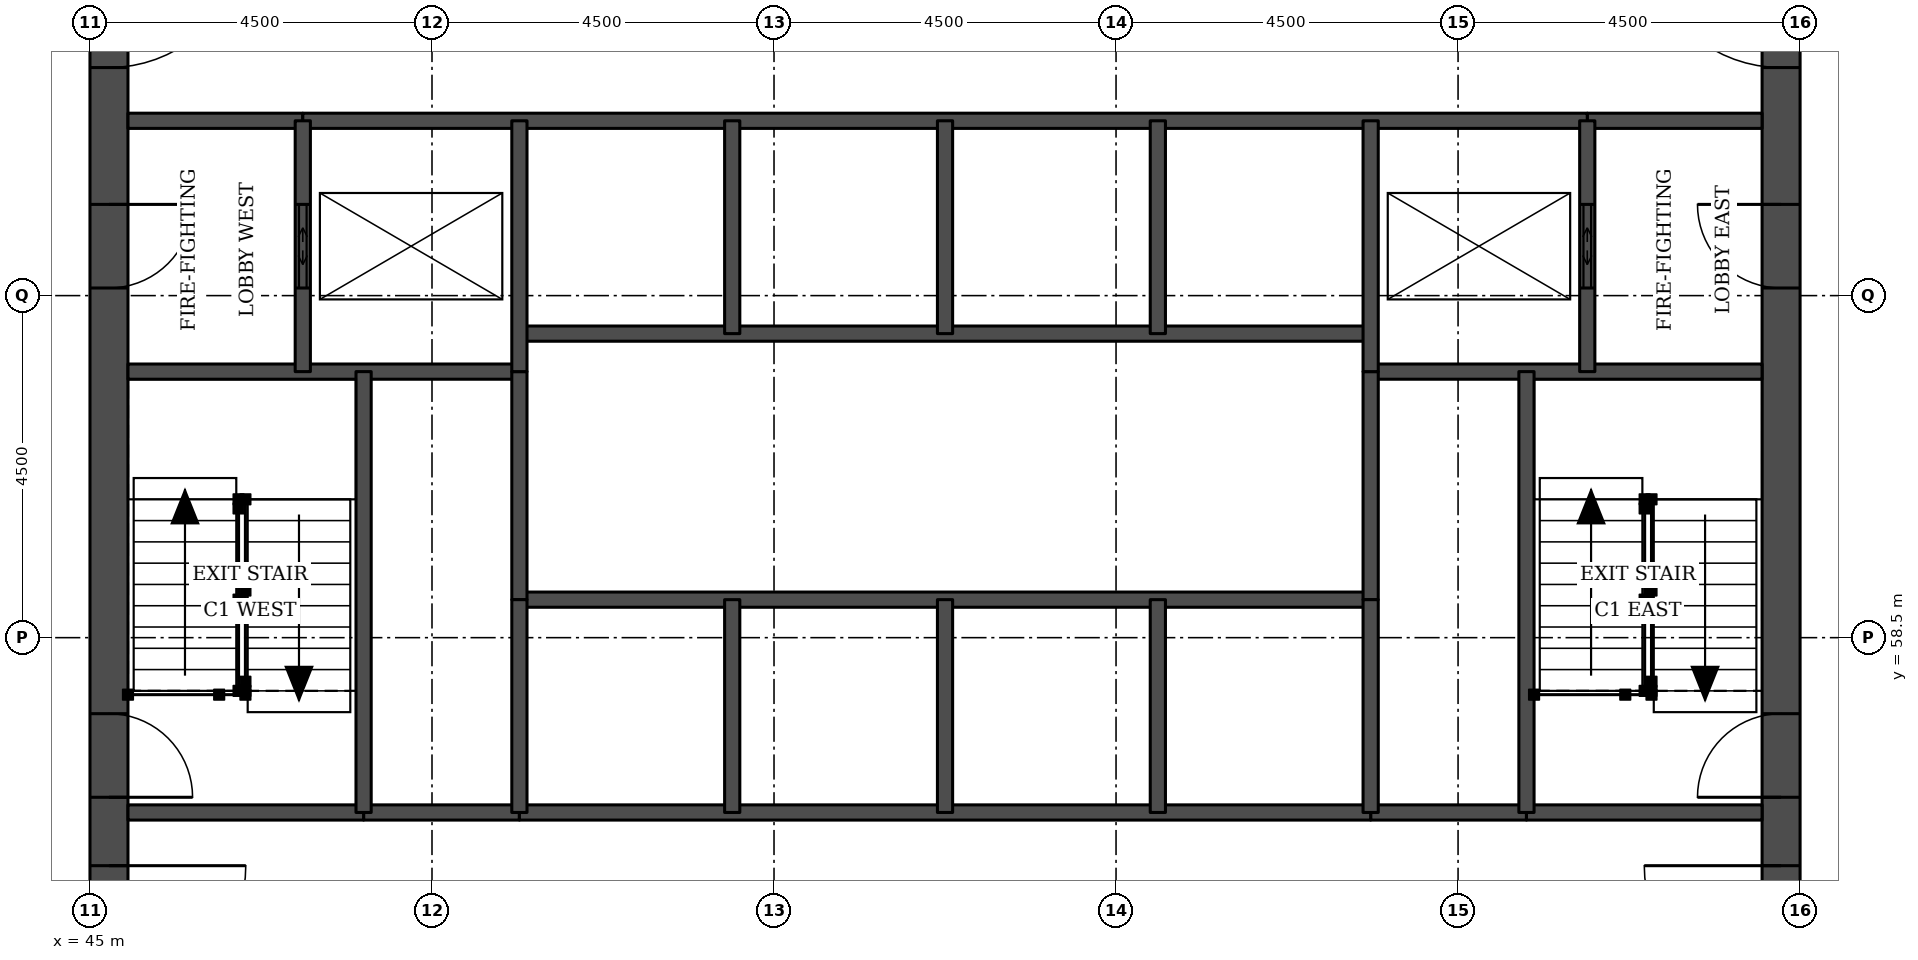
"""IFC4 building model, lengths in metres.
Left out: names, types, materials, properties, quantities, classifications, styles, units other than length and angle.
Written with IfcOpenShell. Run it as: python <this file> out.ifc"""

import sys

from ifc_helpers import new_model, si_unit, direction, frame, frame_2d, origin, place, context, subcontext, project, spatial, rectangle, extrude, element, fill, save


model = new_model("IFC4")
c1 = context("Model", 3, precision=1e-05, world=origin(), true_north=direction((0.0, 1.0)))
c2 = subcontext(c1, "Body", "Model", "MODEL_VIEW")
j1 = project(units=[si_unit("LENGTHUNIT", "METRE"), si_unit("PLANEANGLEUNIT", "RADIAN")], contexts=[c1])
p1 = place(None, origin())
s1 = spatial("IfcSite", under=j1, at=p1, CompositionType="ELEMENT")
p2 = place(p1, origin())
s2 = spatial("IfcBuilding", under=s1, at=p2, CompositionType="ELEMENT")
p3 = place(p2, frame((0.0, 0.0, 23.1)))
s3 = spatial("IfcBuildingStorey", under=s2, at=p3, CompositionType="ELEMENT", Elevation=23.1)
p4 = place(p3, frame((45.25, 49.5, 0.0), z_axis=(0.0, 0.0, 1.0), x_axis=(0.0, 1.0, 0.0)))
e1 = element("IfcWall", 1, at=p4, inside=s3, PredefinedType="SHEAR", context=c2, shape_type="SweptSolid", body=[
    extrude(rectangle(XDim=22.5, YDim=0.5, at=frame_2d((11.25, 0.0))), origin(), (0.0, 0.0, 1.0), 3.3),
])
p5 = place(p4, frame((4.2, 0.0, 0.0)))
e2 = element("IfcOpeningElement", 2, at=p5, cuts=e1, PredefinedType="OPENING", context=c2, shape_type="SweptSolid", body=[
    extrude(rectangle(XDim=1.8, YDim=2.1, at=frame_2d((0.9, 1.05))), frame((0.0, 0.26, 0.0), z_axis=(0.0, -1.0, 0.0), x_axis=(1.0, 0.0, 0.0)), (0.0, 0.0, 1.0), 0.52),
])
p6 = place(p4, frame((6.9, 0.0, 0.0)))
e3 = element("IfcOpeningElement", 3, at=p6, cuts=e1, PredefinedType="OPENING", context=c2, shape_type="SweptSolid", body=[
    extrude(rectangle(XDim=1.1, YDim=2.1, at=frame_2d((0.55, 1.05))), frame((0.0, 0.26, 0.0), z_axis=(0.0, -1.0, 0.0), x_axis=(1.0, 0.0, 0.0)), (0.0, 0.0, 1.0), 0.52),
])
p7 = place(p4, frame((13.6, 0.0, 0.0)))
e4 = element("IfcOpeningElement", 4, at=p7, cuts=e1, PredefinedType="OPENING", context=c2, shape_type="SweptSolid", body=[
    extrude(rectangle(XDim=1.1, YDim=2.1, at=frame_2d((0.55, 1.05))), frame((0.0, 0.26, 0.0), z_axis=(0.0, -1.0, 0.0), x_axis=(1.0, 0.0, 0.0)), (0.0, 0.0, 1.0), 0.52),
])
p8 = place(p4, frame((16.5, 0.0, 0.0)))
e5 = element("IfcOpeningElement", 5, at=p8, cuts=e1, PredefinedType="OPENING", context=c2, shape_type="SweptSolid", body=[
    extrude(rectangle(XDim=1.8, YDim=2.1, at=frame_2d((0.9, 1.05))), frame((0.0, 0.26, 0.0), z_axis=(0.0, -1.0, 0.0), x_axis=(1.0, 0.0, 0.0)), (0.0, 0.0, 1.0), 0.52),
])
p9 = place(p3, frame((67.25, 49.5, 0.0), z_axis=(0.0, 0.0, 1.0), x_axis=(0.0, 1.0, 0.0)))
e6 = element("IfcWall", 6, at=p9, inside=s3, PredefinedType="SHEAR", context=c2, shape_type="SweptSolid", body=[
    extrude(rectangle(XDim=22.5, YDim=0.5, at=frame_2d((11.25, 0.0))), origin(), (0.0, 0.0, 1.0), 3.3),
])
p10 = place(p9, frame((4.2, 0.0, 0.0)))
e7 = element("IfcOpeningElement", 7, at=p10, cuts=e6, PredefinedType="OPENING", context=c2, shape_type="SweptSolid", body=[
    extrude(rectangle(XDim=1.8, YDim=2.1, at=frame_2d((0.9, 1.05))), frame((0.0, 0.26, 0.0), z_axis=(0.0, -1.0, 0.0), x_axis=(1.0, 0.0, 0.0)), (0.0, 0.0, 1.0), 0.52),
])
p11 = place(p9, frame((6.9, 0.0, 0.0)))
e8 = element("IfcOpeningElement", 8, at=p11, cuts=e6, PredefinedType="OPENING", context=c2, shape_type="SweptSolid", body=[
    extrude(rectangle(XDim=1.1, YDim=2.1, at=frame_2d((0.55, 1.05))), frame((0.0, 0.26, 0.0), z_axis=(0.0, -1.0, 0.0), x_axis=(1.0, 0.0, 0.0)), (0.0, 0.0, 1.0), 0.52),
])
p12 = place(p9, frame((13.6, 0.0, 0.0)))
e9 = element("IfcOpeningElement", 9, at=p12, cuts=e6, PredefinedType="OPENING", context=c2, shape_type="SweptSolid", body=[
    extrude(rectangle(XDim=1.1, YDim=2.1, at=frame_2d((0.55, 1.05))), frame((0.0, 0.26, 0.0), z_axis=(0.0, -1.0, 0.0), x_axis=(1.0, 0.0, 0.0)), (0.0, 0.0, 1.0), 0.52),
])
p13 = place(p9, frame((16.5, 0.0, 0.0)))
e10 = element("IfcOpeningElement", 10, at=p13, cuts=e6, PredefinedType="OPENING", context=c2, shape_type="SweptSolid", body=[
    extrude(rectangle(XDim=1.8, YDim=2.1, at=frame_2d((0.9, 1.05))), frame((0.0, 0.26, 0.0), z_axis=(0.0, -1.0, 0.0), x_axis=(1.0, 0.0, 0.0)), (0.0, 0.0, 1.0), 0.52),
])
for number, where, z_axis, x_axis in (
    (11, (48.6, 56.2, 0.0), (0.0, 0.0, 1.0), (1.0, 0.0, 0.0)),
    (12, (61.85, 56.2, 0.0), (0.0, 0.0, 1.0), (1.0, 0.0, 0.0)),
):
    element("IfcWall", number, at=place(p3, frame(where, z_axis=z_axis, x_axis=x_axis)), inside=s3, PredefinedType="SOLIDWALL", context=c2, shape_type="SweptSolid", body=[
        extrude(rectangle(XDim=2.05, YDim=0.2, at=frame_2d((1.025, 0.0))), origin(), (0.0, 0.0, 1.0), 3.08),
    ])
p14 = place(p3, frame((45.5, 56.2, 0.0), z_axis=(0.0, 0.0, 1.0), x_axis=(1.0, 0.0, 0.0)))
e13 = element("IfcWall", 13, at=p14, inside=s3, PredefinedType="SOLIDWALL", context=c2, shape_type="SweptSolid", body=[
    extrude(rectangle(XDim=3.1, YDim=0.2, at=frame_2d((1.55, 0.0))), origin(), (0.0, 0.0, 1.0), 3.08),
])
p15 = place(p3, frame((50.65, 56.2, 0.0), z_axis=(0.0, 0.0, 1.0), x_axis=(1.0, 0.0, 0.0)))
e14 = element("IfcWall", 14, at=p15, inside=s3, PredefinedType="SOLIDWALL", context=c2, shape_type="SweptSolid", body=[
    extrude(rectangle(XDim=11.2, YDim=0.2, at=frame_2d((5.6, 0.0))), origin(), (0.0, 0.0, 1.0), 3.08),
])
p16 = place(p3, frame((63.9, 56.2, 0.0), z_axis=(0.0, 0.0, 1.0), x_axis=(1.0, 0.0, 0.0)))
e15 = element("IfcWall", 15, at=p16, inside=s3, PredefinedType="SOLIDWALL", context=c2, shape_type="SweptSolid", body=[
    extrude(rectangle(XDim=3.1, YDim=0.2, at=frame_2d((1.55, 0.0))), origin(), (0.0, 0.0, 1.0), 3.08),
])
p17 = place(p3, frame((50.65, 59.0, 0.0), z_axis=(0.0, 0.0, 1.0), x_axis=(1.0, 0.0, 0.0)))
e16 = element("IfcWall", 16, at=p17, inside=s3, PredefinedType="SOLIDWALL", context=c2, shape_type="SweptSolid", body=[
    extrude(rectangle(XDim=11.2, YDim=0.2, at=frame_2d((5.6, 0.0))), origin(), (0.0, 0.0, 1.0), 3.3),
])
for number, where, z_axis, x_axis in (
    (17, (45.5, 62.0, 0.0), (0.0, 0.0, 1.0), (1.0, 0.0, 0.0)),
    (18, (61.85, 62.0, 0.0), (0.0, 0.0, 1.0), (1.0, 0.0, 0.0)),
):
    element("IfcWall", number, at=place(p3, frame(where, z_axis=z_axis, x_axis=x_axis)), inside=s3, PredefinedType="SOLIDWALL", context=c2, shape_type="SweptSolid", body=[
        extrude(rectangle(XDim=5.15, YDim=0.2, at=frame_2d((2.575, 0.0))), origin(), (0.0, 0.0, 1.0), 3.08),
    ])
p18 = place(p3, frame((50.65, 62.5, 0.0), z_axis=(0.0, 0.0, 1.0), x_axis=(1.0, 0.0, 0.0)))
e19 = element("IfcWall", 19, at=p18, inside=s3, PredefinedType="SOLIDWALL", context=c2, shape_type="SweptSolid", body=[
    extrude(rectangle(XDim=11.2, YDim=0.2, at=frame_2d((5.6, 0.0))), origin(), (0.0, 0.0, 1.0), 3.3),
])
for number, where, z_axis, x_axis in (
    (20, (45.5, 65.3, 0.0), (0.0, 0.0, 1.0), (1.0, 0.0, 0.0)),
    (21, (64.7, 65.3, 0.0), (0.0, 0.0, 1.0), (1.0, 0.0, 0.0)),
):
    element("IfcWall", number, at=place(p3, frame(where, z_axis=z_axis, x_axis=x_axis)), inside=s3, PredefinedType="SOLIDWALL", context=c2, shape_type="SweptSolid", body=[
        extrude(rectangle(XDim=2.3, YDim=0.2, at=frame_2d((1.15, 0.0))), origin(), (0.0, 0.0, 1.0), 3.08),
    ])
p19 = place(p3, frame((47.8, 65.3, 0.0), z_axis=(0.0, 0.0, 1.0), x_axis=(1.0, 0.0, 0.0)))
e22 = element("IfcWall", 22, at=p19, inside=s3, PredefinedType="SOLIDWALL", context=c2, shape_type="SweptSolid", body=[
    extrude(rectangle(XDim=16.9, YDim=0.2, at=frame_2d((8.45, 0.0))), origin(), (0.0, 0.0, 1.0), 3.08),
])
p20 = place(p3, frame((47.8, 62.0, 0.0), z_axis=(0.0, 0.0, 1.0), x_axis=(0.0, 1.0, 0.0)))
e23 = element("IfcWall", 23, at=p20, inside=s3, PredefinedType="SOLIDWALL", context=c2, shape_type="SweptSolid", body=[
    extrude(rectangle(XDim=3.3, YDim=0.2, at=frame_2d((1.65, 0.0))), origin(), (0.0, 0.0, 1.0), 3.08),
])
p21 = place(p20, frame((1.1, 0.0, 0.0)))
e24 = element("IfcOpeningElement", 24, at=p21, cuts=e23, PredefinedType="OPENING", context=c2, shape_type="SweptSolid", body=[
    extrude(rectangle(XDim=1.1, YDim=2.1, at=frame_2d((0.55, 1.05))), frame((0.0, 0.11, 0.0), z_axis=(0.0, -1.0, 0.0), x_axis=(1.0, 0.0, 0.0)), (0.0, 0.0, 1.0), 0.22),
])
p22 = place(p3, frame((48.6, 56.2, 0.0), z_axis=(0.0, 0.0, 1.0), x_axis=(0.0, 1.0, 0.0)))
e25 = element("IfcWall", 25, at=p22, inside=s3, PredefinedType="SOLIDWALL", context=c2, shape_type="SweptSolid", body=[
    extrude(rectangle(XDim=5.8, YDim=0.2, at=frame_2d((2.9, 0.0))), origin(), (0.0, 0.0, 1.0), 3.08),
])
p23 = place(p3, frame((50.65, 59.0, 0.0), z_axis=(0.0, 0.0, 1.0), x_axis=(0.0, 1.0, 0.0)))
e26 = element("IfcWall", 26, at=p23, inside=s3, PredefinedType="SOLIDWALL", context=c2, shape_type="SweptSolid", body=[
    extrude(rectangle(XDim=3.0, YDim=0.2, at=frame_2d((1.5, 0.0))), origin(), (0.0, 0.0, 1.0), 3.3),
])
p24 = place(p3, frame((50.65, 56.2, 0.0), z_axis=(0.0, 0.0, 1.0), x_axis=(0.0, 1.0, 0.0)))
e27 = element("IfcWall", 27, at=p24, inside=s3, PredefinedType="SOLIDWALL", context=c2, shape_type="SweptSolid", body=[
    extrude(rectangle(XDim=2.8, YDim=0.2, at=frame_2d((1.4, 0.0))), origin(), (0.0, 0.0, 1.0), 3.08),
])
p25 = place(p3, frame((50.65, 62.0, 0.0), z_axis=(0.0, 0.0, 1.0), x_axis=(0.0, 1.0, 0.0)))
e28 = element("IfcWall", 28, at=p25, inside=s3, PredefinedType="SOLIDWALL", context=c2, shape_type="SweptSolid", body=[
    extrude(rectangle(XDim=3.3, YDim=0.2, at=frame_2d((1.65, 0.0))), origin(), (0.0, 0.0, 1.0), 3.08),
])
for number, where, z_axis, x_axis in (
    (29, (53.45, 56.2, 0.0), (0.0, 0.0, 1.0), (0.0, 1.0, 0.0)),
    (30, (53.45, 62.5, 0.0), (0.0, 0.0, 1.0), (0.0, 1.0, 0.0)),
    (31, (56.25, 56.2, 0.0), (0.0, 0.0, 1.0), (0.0, 1.0, 0.0)),
    (32, (56.25, 62.5, 0.0), (0.0, 0.0, 1.0), (0.0, 1.0, 0.0)),
    (33, (59.05, 56.2, 0.0), (0.0, 0.0, 1.0), (0.0, 1.0, 0.0)),
    (34, (59.05, 62.5, 0.0), (0.0, 0.0, 1.0), (0.0, 1.0, 0.0)),
):
    element("IfcWall", number, at=place(p3, frame(where, z_axis=z_axis, x_axis=x_axis)), inside=s3, PredefinedType="SOLIDWALL", context=c2, shape_type="SweptSolid", body=[
        extrude(rectangle(XDim=2.8, YDim=0.2, at=frame_2d((1.4, 0.0))), origin(), (0.0, 0.0, 1.0), 3.08),
    ])
p26 = place(p3, frame((61.85, 59.0, 0.0), z_axis=(0.0, 0.0, 1.0), x_axis=(0.0, 1.0, 0.0)))
e35 = element("IfcWall", 35, at=p26, inside=s3, PredefinedType="SOLIDWALL", context=c2, shape_type="SweptSolid", body=[
    extrude(rectangle(XDim=3.0, YDim=0.2, at=frame_2d((1.5, 0.0))), origin(), (0.0, 0.0, 1.0), 3.3),
])
p27 = place(p3, frame((61.85, 56.2, 0.0), z_axis=(0.0, 0.0, 1.0), x_axis=(0.0, 1.0, 0.0)))
e36 = element("IfcWall", 36, at=p27, inside=s3, PredefinedType="SOLIDWALL", context=c2, shape_type="SweptSolid", body=[
    extrude(rectangle(XDim=2.8, YDim=0.2, at=frame_2d((1.4, 0.0))), origin(), (0.0, 0.0, 1.0), 3.08),
])
p28 = place(p3, frame((61.85, 62.0, 0.0), z_axis=(0.0, 0.0, 1.0), x_axis=(0.0, 1.0, 0.0)))
e37 = element("IfcWall", 37, at=p28, inside=s3, PredefinedType="SOLIDWALL", context=c2, shape_type="SweptSolid", body=[
    extrude(rectangle(XDim=3.3, YDim=0.2, at=frame_2d((1.65, 0.0))), origin(), (0.0, 0.0, 1.0), 3.08),
])
p29 = place(p3, frame((63.9, 56.2, 0.0), z_axis=(0.0, 0.0, 1.0), x_axis=(0.0, 1.0, 0.0)))
e38 = element("IfcWall", 38, at=p29, inside=s3, PredefinedType="SOLIDWALL", context=c2, shape_type="SweptSolid", body=[
    extrude(rectangle(XDim=5.8, YDim=0.2, at=frame_2d((2.9, 0.0))), origin(), (0.0, 0.0, 1.0), 3.08),
])
p30 = place(p3, frame((64.7, 62.0, 0.0), z_axis=(0.0, 0.0, 1.0), x_axis=(0.0, 1.0, 0.0)))
e39 = element("IfcWall", 39, at=p30, inside=s3, PredefinedType="SOLIDWALL", context=c2, shape_type="SweptSolid", body=[
    extrude(rectangle(XDim=3.3, YDim=0.2, at=frame_2d((1.65, 0.0))), origin(), (0.0, 0.0, 1.0), 3.08),
])
p31 = place(p30, frame((1.1, 0.0, 0.0)))
e40 = element("IfcOpeningElement", 40, at=p31, cuts=e39, PredefinedType="OPENING", context=c2, shape_type="SweptSolid", body=[
    extrude(rectangle(XDim=1.1, YDim=2.1, at=frame_2d((0.55, 1.05))), frame((0.0, 0.11, 0.0), z_axis=(0.0, -1.0, 0.0), x_axis=(1.0, 0.0, 0.0)), (0.0, 0.0, 1.0), 0.22),
])
p32 = place(p21, origin())
e41 = element("IfcDoor", 41, at=p32, inside=s3, OperationType="DOUBLE_DOOR_SLIDING", PredefinedType="DOOR", context=c2, shape_type="SweptSolid", body=[
    extrude(rectangle(XDim=1.1, YDim=2.1, at=frame_2d((0.55, 1.05))), frame((0.0, 0.025, 0.0), z_axis=(0.0, -1.0, 0.0), x_axis=(1.0, 0.0, 0.0)), (0.0, 0.0, 1.0), 0.05),
])
fill(e24, e41)
p33 = place(p31, origin())
e42 = element("IfcDoor", 42, at=p33, inside=s3, OperationType="DOUBLE_DOOR_SLIDING", PredefinedType="DOOR", context=c2, shape_type="SweptSolid", body=[
    extrude(rectangle(XDim=1.1, YDim=2.1, at=frame_2d((0.55, 1.05))), frame((0.0, 0.025, 0.0), z_axis=(0.0, -1.0, 0.0), x_axis=(1.0, 0.0, 0.0)), (0.0, 0.0, 1.0), 0.05),
])
fill(e40, e42)
p34 = place(p5, frame((1.8, 0.0, 0.0), z_axis=(0.0, 0.0, 1.0), x_axis=(-1.0, 0.0, 0.0)))
e43 = element("IfcDoor", 43, at=p34, inside=s3, OperationType="SINGLE_SWING_LEFT", PredefinedType="DOOR", context=c2, shape_type="SweptSolid", body=[
    extrude(rectangle(XDim=1.8, YDim=2.1, at=frame_2d((0.9, 1.05))), frame((0.0, 0.025, 0.0), z_axis=(0.0, -1.0, 0.0), x_axis=(1.0, 0.0, 0.0)), (0.0, 0.0, 1.0), 0.05),
])
fill(e2, e43)
p35 = place(p6, frame((1.1, 0.0, 0.0), z_axis=(0.0, 0.0, 1.0), x_axis=(-1.0, 0.0, 0.0)))
e44 = element("IfcDoor", 44, at=p35, inside=s3, OperationType="SINGLE_SWING_RIGHT", PredefinedType="DOOR", context=c2, shape_type="SweptSolid", body=[
    extrude(rectangle(XDim=1.1, YDim=2.1, at=frame_2d((0.55, 1.05))), frame((0.0, 0.025, 0.0), z_axis=(0.0, -1.0, 0.0), x_axis=(1.0, 0.0, 0.0)), (0.0, 0.0, 1.0), 0.05),
])
fill(e3, e44)
p36 = place(p7, frame((1.1, 0.0, 0.0), z_axis=(0.0, 0.0, 1.0), x_axis=(-1.0, 0.0, 0.0)))
e45 = element("IfcDoor", 45, at=p36, inside=s3, OperationType="SINGLE_SWING_LEFT", PredefinedType="DOOR", context=c2, shape_type="SweptSolid", body=[
    extrude(rectangle(XDim=1.1, YDim=2.1, at=frame_2d((0.55, 1.05))), frame((0.0, 0.025, 0.0), z_axis=(0.0, -1.0, 0.0), x_axis=(1.0, 0.0, 0.0)), (0.0, 0.0, 1.0), 0.05),
])
fill(e4, e45)
p37 = place(p8, frame((1.8, 0.0, 0.0), z_axis=(0.0, 0.0, 1.0), x_axis=(-1.0, 0.0, 0.0)))
e46 = element("IfcDoor", 46, at=p37, inside=s3, OperationType="SINGLE_SWING_LEFT", PredefinedType="DOOR", context=c2, shape_type="SweptSolid", body=[
    extrude(rectangle(XDim=1.8, YDim=2.1, at=frame_2d((0.9, 1.05))), frame((0.0, 0.025, 0.0), z_axis=(0.0, -1.0, 0.0), x_axis=(1.0, 0.0, 0.0)), (0.0, 0.0, 1.0), 0.05),
])
fill(e5, e46)
p38 = place(p10, origin())
e47 = element("IfcDoor", 47, at=p38, inside=s3, OperationType="SINGLE_SWING_RIGHT", PredefinedType="DOOR", context=c2, shape_type="SweptSolid", body=[
    extrude(rectangle(XDim=1.8, YDim=2.1, at=frame_2d((0.9, 1.05))), frame((0.0, 0.025, 0.0), z_axis=(0.0, -1.0, 0.0), x_axis=(1.0, 0.0, 0.0)), (0.0, 0.0, 1.0), 0.05),
])
fill(e7, e47)
p39 = place(p11, origin())
e48 = element("IfcDoor", 48, at=p39, inside=s3, OperationType="SINGLE_SWING_LEFT", PredefinedType="DOOR", context=c2, shape_type="SweptSolid", body=[
    extrude(rectangle(XDim=1.1, YDim=2.1, at=frame_2d((0.55, 1.05))), frame((0.0, 0.025, 0.0), z_axis=(0.0, -1.0, 0.0), x_axis=(1.0, 0.0, 0.0)), (0.0, 0.0, 1.0), 0.05),
])
fill(e8, e48)
p40 = place(p12, origin())
e49 = element("IfcDoor", 49, at=p40, inside=s3, OperationType="SINGLE_SWING_RIGHT", PredefinedType="DOOR", context=c2, shape_type="SweptSolid", body=[
    extrude(rectangle(XDim=1.1, YDim=2.1, at=frame_2d((0.55, 1.05))), frame((0.0, 0.025, 0.0), z_axis=(0.0, -1.0, 0.0), x_axis=(1.0, 0.0, 0.0)), (0.0, 0.0, 1.0), 0.05),
])
fill(e9, e49)
p41 = place(p13, origin())
e50 = element("IfcDoor", 50, at=p41, inside=s3, OperationType="SINGLE_SWING_RIGHT", PredefinedType="DOOR", context=c2, shape_type="SweptSolid", body=[
    extrude(rectangle(XDim=1.8, YDim=2.1, at=frame_2d((0.9, 1.05))), frame((0.0, 0.025, 0.0), z_axis=(0.0, -1.0, 0.0), x_axis=(1.0, 0.0, 0.0)), (0.0, 0.0, 1.0), 0.05),
])
fill(e10, e50)
save(model, sys.argv[1])
